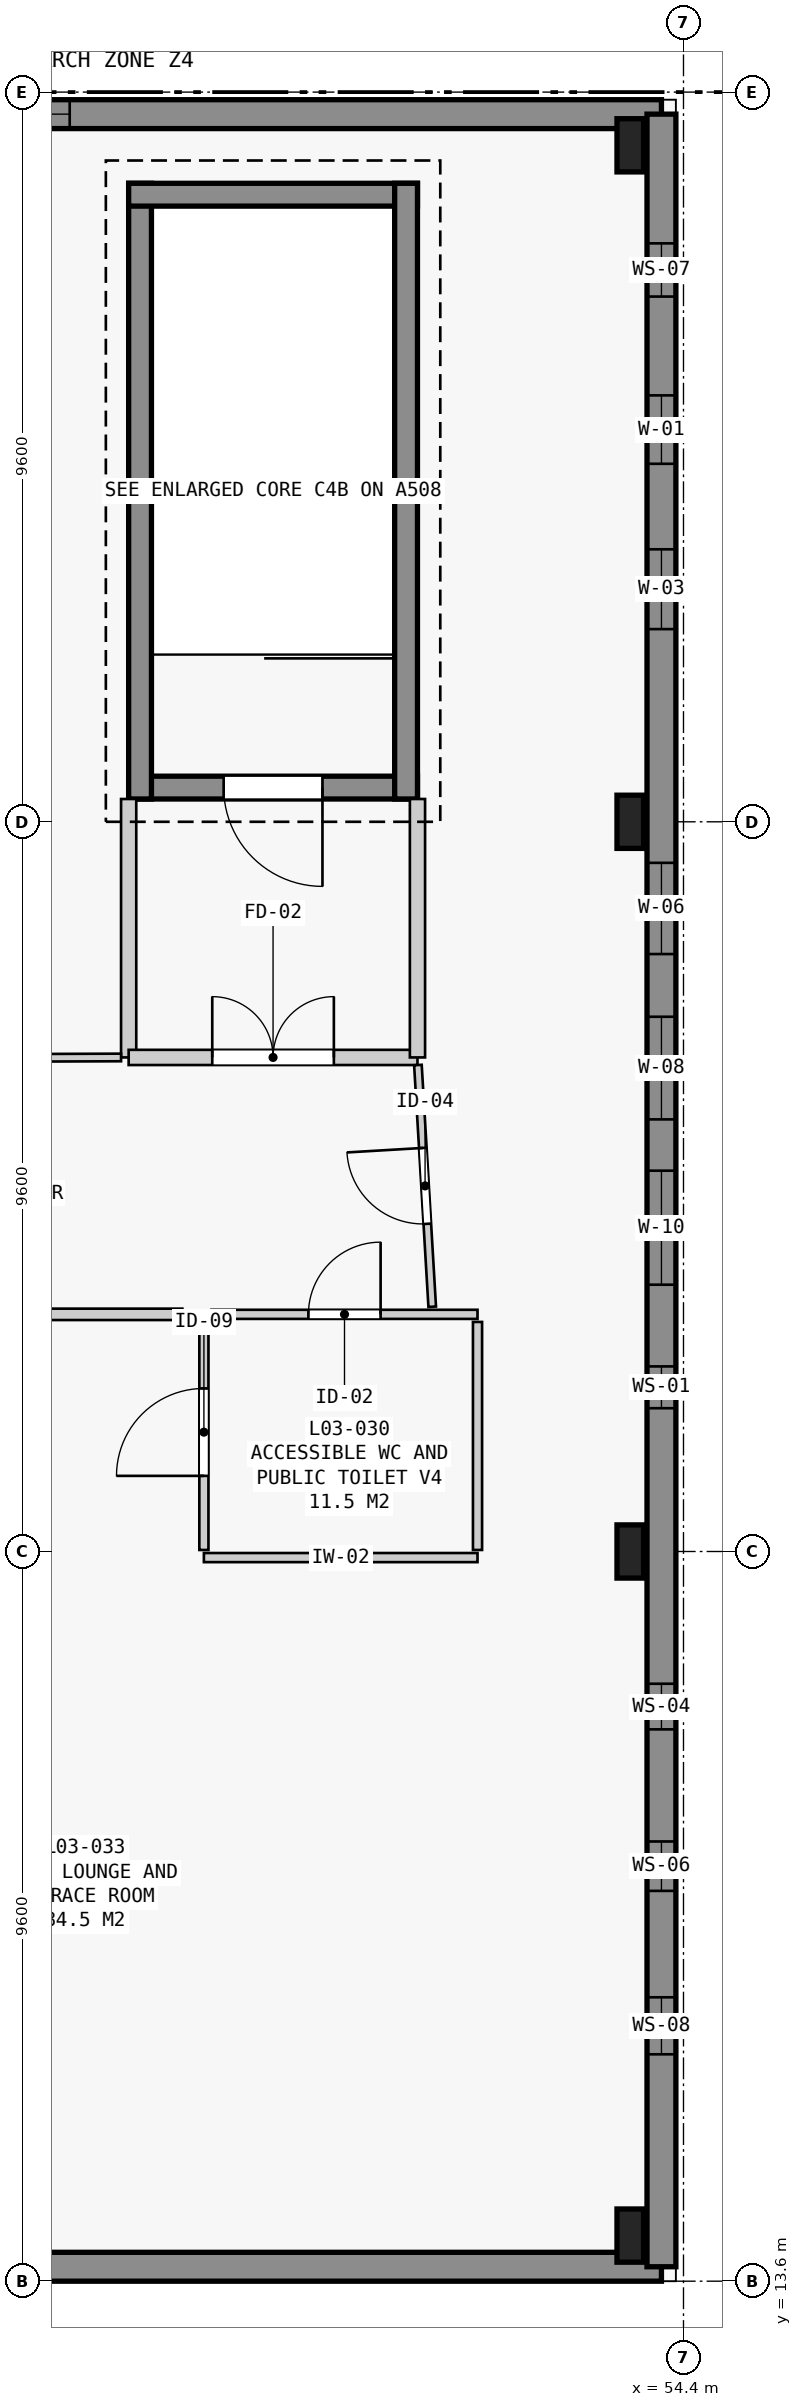
"""IFC4 building model, lengths in metres.
Left out: names, types, materials, properties, quantities, classifications, styles, units other than length and angle.
Written with IfcOpenShell. Run it as: python <this file> out.ifc"""

import sys

from ifc_helpers import new_model, si_unit, direction, frame, frame_2d, origin, origin_2d, place, context, subcontext, project, spatial, rectangle, extrude, element, fill, save


model = new_model("IFC4")
c1 = context("Model", 3, precision=1e-05, world=origin(), true_north=direction((0.0, 1.0)))
c2 = subcontext(c1, "Body", "Model", "MODEL_VIEW")
j1 = project(units=[si_unit("LENGTHUNIT", "METRE"), si_unit("PLANEANGLEUNIT", "RADIAN")], contexts=[c1])
p1 = place(None, origin())
s1 = spatial("IfcSite", under=j1, at=p1, CompositionType="ELEMENT")
p2 = place(p1, origin())
s2 = spatial("IfcBuilding", under=s1, at=p2, CompositionType="ELEMENT")
p3 = place(p2, frame((0.0, 0.0, 13.8)))
s3 = spatial("IfcBuildingStorey", under=s2, at=p3, CompositionType="ELEMENT", Elevation=13.8)
for number, where, z_axis, x_axis in (
    (1, (53.7, 14.2, 0.0), (0.0, 0.0, 1.0), (1.0, 0.0, 0.0)),
    (2, (53.7, 23.2, 0.0), (0.0, 0.0, 1.0), (1.0, 0.0, 0.0)),
    (3, (53.7, 32.8, 0.0), (0.0, 0.0, 1.0), (1.0, 0.0, 0.0)),
    (4, (53.7, 41.7, 0.0), (0.0, 0.0, 1.0), (1.0, 0.0, 0.0)),
):
    element("IfcColumn", number, at=place(p3, frame(where, z_axis=z_axis, x_axis=x_axis)), inside=s3, PredefinedType="COLUMN", context=c2, shape_type="SweptSolid", body=[
        extrude(rectangle(XDim=0.35, YDim=0.7, at=origin_2d()), origin(), (0.0, 0.0, 1.0), 4.5),
    ])
p4 = place(p3, frame((54.11, 13.79, 0.0), z_axis=(0.0, 0.0, 1.0), x_axis=(-1.0, 0.0, 0.0)))
e5 = element("IfcWall", 5, at=p4, inside=s3, PredefinedType="STANDARD", context=c2, shape_type="SweptSolid", body=[
    extrude(rectangle(XDim=18.72, YDim=0.38, at=frame_2d((9.36, 0.0))), origin(), (0.0, 0.0, 1.0), 4.24),
])
p5 = place(p4, frame((8.834, 0.0, 1.05)))
e6 = element("IfcOpeningElement", 6, at=p5, cuts=e5, PredefinedType="OPENING", context=c2, shape_type="SweptSolid", body=[
    extrude(rectangle(XDim=1.8, YDim=2.5, at=frame_2d((0.9, 1.25))), frame((0.0, 0.2, 0.0), z_axis=(0.0, -1.0, 0.0), x_axis=(1.0, 0.0, 0.0)), (0.0, 0.0, 1.0), 0.4),
])
p6 = place(p3, frame((35.39, 42.11, 0.0), z_axis=(0.0, 0.0, 1.0), x_axis=(1.0, 0.0, 0.0)))
e7 = element("IfcWall", 7, at=p6, inside=s3, PredefinedType="STANDARD", context=c2, shape_type="SweptSolid", body=[
    extrude(rectangle(XDim=18.72, YDim=0.38, at=frame_2d((9.36, 0.0))), origin(), (0.0, 0.0, 1.0), 4.24),
])
p7 = place(p6, frame((8.534, 0.0, 1.65)))
e8 = element("IfcOpeningElement", 8, at=p7, cuts=e7, PredefinedType="OPENING", context=c2, shape_type="SweptSolid", body=[
    extrude(rectangle(XDim=2.4, YDim=1.8, at=frame_2d((1.2, 0.9))), frame((0.0, 0.2, 0.0), z_axis=(0.0, -1.0, 0.0), x_axis=(1.0, 0.0, 0.0)), (0.0, 0.0, 1.0), 0.4),
])
p8 = place(p3, frame((54.11, 42.11, 0.0), z_axis=(0.0, 0.0, 1.0), x_axis=(0.0, -1.0, 0.0)))
e9 = element("IfcWall", 9, at=p8, inside=s3, PredefinedType="STANDARD", context=c2, shape_type="SweptSolid", body=[
    extrude(rectangle(XDim=28.32, YDim=0.38, at=frame_2d((14.16, 0.0))), origin(), (0.0, 0.0, 1.0), 4.24),
])
p9 = place(p8, frame((1.7, 0.0, 0.95)))
e10 = element("IfcOpeningElement", 10, at=p9, cuts=e9, PredefinedType="OPENING", context=c2, shape_type="SweptSolid", body=[
    extrude(rectangle(XDim=0.7, YDim=2.1, at=frame_2d((0.35, 1.05))), frame((0.0, 0.2, 0.0), z_axis=(0.0, -1.0, 0.0), x_axis=(1.0, 0.0, 0.0)), (0.0, 0.0, 1.0), 0.4),
])
p10 = place(p8, frame((3.7, 0.0, 0.95)))
e11 = element("IfcOpeningElement", 11, at=p10, cuts=e9, PredefinedType="OPENING", context=c2, shape_type="SweptSolid", body=[
    extrude(rectangle(XDim=0.9, YDim=1.8, at=frame_2d((0.45, 0.9))), frame((0.0, 0.2, 0.0), z_axis=(0.0, -1.0, 0.0), x_axis=(1.0, 0.0, 0.0)), (0.0, 0.0, 1.0), 0.4),
])
p11 = place(p8, frame((5.725, 0.0, 0.95)))
e12 = element("IfcOpeningElement", 12, at=p11, cuts=e9, PredefinedType="OPENING", context=c2, shape_type="SweptSolid", body=[
    extrude(rectangle(XDim=1.05, YDim=1.9, at=frame_2d((0.525, 0.95))), frame((0.0, 0.2, 0.0), z_axis=(0.0, -1.0, 0.0), x_axis=(1.0, 0.0, 0.0)), (0.0, 0.0, 1.0), 0.4),
])
p12 = place(p8, frame((9.85, 0.0, 0.95)))
e13 = element("IfcOpeningElement", 13, at=p12, cuts=e9, PredefinedType="OPENING", context=c2, shape_type="SweptSolid", body=[
    extrude(rectangle(XDim=1.2, YDim=2.1, at=frame_2d((0.6, 1.05))), frame((0.0, 0.2, 0.0), z_axis=(0.0, -1.0, 0.0), x_axis=(1.0, 0.0, 0.0)), (0.0, 0.0, 1.0), 0.4),
])
p13 = place(p8, frame((11.875, 0.0, 0.95)))
e14 = element("IfcOpeningElement", 14, at=p13, cuts=e9, PredefinedType="OPENING", context=c2, shape_type="SweptSolid", body=[
    extrude(rectangle(XDim=1.35, YDim=2.1, at=frame_2d((0.675, 1.05))), frame((0.0, 0.2, 0.0), z_axis=(0.0, -1.0, 0.0), x_axis=(1.0, 0.0, 0.0)), (0.0, 0.0, 1.0), 0.4),
])
p14 = place(p8, frame((13.9, 0.0, 0.95)))
e15 = element("IfcOpeningElement", 15, at=p14, cuts=e9, PredefinedType="OPENING", context=c2, shape_type="SweptSolid", body=[
    extrude(rectangle(XDim=1.5, YDim=1.8, at=frame_2d((0.75, 0.9))), frame((0.0, 0.2, 0.0), z_axis=(0.0, -1.0, 0.0), x_axis=(1.0, 0.0, 0.0)), (0.0, 0.0, 1.0), 0.4),
])
p15 = place(p8, frame((16.475, 0.0, 0.95)))
e16 = element("IfcOpeningElement", 16, at=p15, cuts=e9, PredefinedType="OPENING", context=c2, shape_type="SweptSolid", body=[
    extrude(rectangle(XDim=0.55, YDim=1.8, at=frame_2d((0.275, 0.9))), frame((0.0, 0.2, 0.0), z_axis=(0.0, -1.0, 0.0), x_axis=(1.0, 0.0, 0.0)), (0.0, 0.0, 1.0), 0.4),
])
p16 = place(p8, frame((20.65, 0.0, 0.95)))
e17 = element("IfcOpeningElement", 17, at=p16, cuts=e9, PredefinedType="OPENING", context=c2, shape_type="SweptSolid", body=[
    extrude(rectangle(XDim=0.6, YDim=2.2, at=frame_2d((0.3, 1.1))), frame((0.0, 0.2, 0.0), z_axis=(0.0, -1.0, 0.0), x_axis=(1.0, 0.0, 0.0)), (0.0, 0.0, 1.0), 0.4),
])
p17 = place(p8, frame((22.725, 0.0, 0.95)))
e18 = element("IfcOpeningElement", 18, at=p17, cuts=e9, PredefinedType="OPENING", context=c2, shape_type="SweptSolid", body=[
    extrude(rectangle(XDim=0.65, YDim=2.4, at=frame_2d((0.325, 1.2))), frame((0.0, 0.2, 0.0), z_axis=(0.0, -1.0, 0.0), x_axis=(1.0, 0.0, 0.0)), (0.0, 0.0, 1.0), 0.4),
])
p18 = place(p8, frame((24.775, 0.0, 0.95)))
e19 = element("IfcOpeningElement", 19, at=p18, cuts=e9, PredefinedType="OPENING", context=c2, shape_type="SweptSolid", body=[
    extrude(rectangle(XDim=0.75, YDim=2.3, at=frame_2d((0.375, 1.15))), frame((0.0, 0.2, 0.0), z_axis=(0.0, -1.0, 0.0), x_axis=(1.0, 0.0, 0.0)), (0.0, 0.0, 1.0), 0.4),
])
p19 = place(p3, frame((50.9, 33.25, 0.0), z_axis=(0.0, 0.0, 1.0), x_axis=(-1.0, 0.0, 0.0)))
e20 = element("IfcWall", 20, at=p19, inside=s3, PredefinedType="SHEAR", context=c2, shape_type="SweptSolid", body=[
    extrude(rectangle(XDim=3.8, YDim=0.3, at=frame_2d((1.9, 0.0))), origin(), (0.0, 0.0, 1.0), 4.5),
])
p20 = place(p19, frame((1.25, 0.0, 0.0)))
e21 = element("IfcOpeningElement", 21, at=p20, cuts=e20, PredefinedType="OPENING", context=c2, shape_type="SweptSolid", body=[
    extrude(rectangle(XDim=1.3, YDim=2.2, at=frame_2d((0.65, 1.1))), frame((0.0, 0.16, 0.0), z_axis=(0.0, -1.0, 0.0), x_axis=(1.0, 0.0, 0.0)), (0.0, 0.0, 1.0), 0.32),
])
p21 = place(p3, frame((47.25, 33.1, 0.0), z_axis=(0.0, 0.0, 1.0), x_axis=(0.0, 1.0, 0.0)))
e22 = element("IfcWall", 22, at=p21, inside=s3, PredefinedType="SHEAR", context=c2, shape_type="SweptSolid", body=[
    extrude(rectangle(XDim=8.1, YDim=0.3, at=frame_2d((4.05, 0.0))), origin(), (0.0, 0.0, 1.0), 4.5),
])
p22 = place(p3, frame((47.1, 41.05, 0.0), z_axis=(0.0, 0.0, 1.0), x_axis=(1.0, 0.0, 0.0)))
e23 = element("IfcWall", 23, at=p22, inside=s3, PredefinedType="SHEAR", context=c2, shape_type="SweptSolid", body=[
    extrude(rectangle(XDim=3.8, YDim=0.3, at=frame_2d((1.9, 0.0))), origin(), (0.0, 0.0, 1.0), 4.5),
])
p23 = place(p3, frame((50.75, 41.2, 0.0), z_axis=(0.0, 0.0, 1.0), x_axis=(0.0, -1.0, 0.0)))
e24 = element("IfcWall", 24, at=p23, inside=s3, PredefinedType="SHEAR", context=c2, shape_type="SweptSolid", body=[
    extrude(rectangle(XDim=8.1, YDim=0.3, at=frame_2d((4.05, 0.0))), origin(), (0.0, 0.0, 1.0), 4.5),
])
p24 = place(p3, frame((47.1, 33.1, 0.0), z_axis=(0.0, 0.0, 1.0), x_axis=(0.0, -1.0, 0.0)))
e25 = element("IfcWall", 25, at=p24, inside=s3, PredefinedType="STANDARD", context=c2, shape_type="SweptSolid", body=[
    extrude(rectangle(XDim=3.4, YDim=0.2, at=frame_2d((1.7, 0.0))), origin(), (0.0, 0.0, 1.0), 3.47),
])
p25 = place(p3, frame((47.1, 29.7, 0.0), z_axis=(0.0, 0.0, 1.0), x_axis=(1.0, 0.0, 0.0)))
e26 = element("IfcWall", 26, at=p25, inside=s3, PredefinedType="STANDARD", context=c2, shape_type="SweptSolid", body=[
    extrude(rectangle(XDim=3.8, YDim=0.2, at=frame_2d((1.9, 0.0))), origin(), (0.0, 0.0, 1.0), 4.5),
])
p26 = place(p25, frame((1.1, 0.0, 0.0)))
e27 = element("IfcOpeningElement", 27, at=p26, cuts=e26, PredefinedType="OPENING", context=c2, shape_type="SweptSolid", body=[
    extrude(rectangle(XDim=1.6, YDim=2.2, at=frame_2d((0.8, 1.1))), frame((0.0, 0.11, 0.0), z_axis=(0.0, -1.0, 0.0), x_axis=(1.0, 0.0, 0.0)), (0.0, 0.0, 1.0), 0.22),
])
p27 = place(p3, frame((50.9, 29.7, 0.0), z_axis=(0.0, 0.0, 1.0), x_axis=(0.0, 1.0, 0.0)))
e28 = element("IfcWall", 28, at=p27, inside=s3, PredefinedType="STANDARD", context=c2, shape_type="SweptSolid", body=[
    extrude(rectangle(XDim=3.4, YDim=0.2, at=frame_2d((1.7, 0.0))), origin(), (0.0, 0.0, 1.0), 3.47),
])
p28 = place(p3, frame((51.69, 23.12, 0.0), z_axis=(0.0, 0.0, 1.0), x_axis=(-1.0, 0.0, 0.0)))
e29 = element("IfcWall", 29, at=p28, inside=s3, PredefinedType="PARTITIONING", context=c2, shape_type="SweptSolid", body=[
    extrude(rectangle(XDim=3.6, YDim=0.12, at=frame_2d((1.8, 0.0))), origin(), (0.0, 0.0, 1.0), 3.52),
])
p29 = place(p3, frame((48.09, 23.22, 0.0), z_axis=(0.0, 0.0, 1.0), x_axis=(0.0, 1.0, 0.0)))
e30 = element("IfcWall", 30, at=p29, inside=s3, PredefinedType="PARTITIONING", context=c2, shape_type="SweptSolid", body=[
    extrude(rectangle(XDim=3.1, YDim=0.12, at=frame_2d((1.55, 0.0))), origin(), (0.0, 0.0, 1.0), 3.52),
])
p30 = place(p29, frame((0.975, 0.0, 0.0)))
e31 = element("IfcOpeningElement", 31, at=p30, cuts=e30, PredefinedType="OPENING", context=c2, shape_type="SweptSolid", body=[
    extrude(rectangle(XDim=1.15, YDim=2.2, at=frame_2d((0.575, 1.1))), frame((0.0, 0.07, 0.0), z_axis=(0.0, -1.0, 0.0), x_axis=(1.0, 0.0, 0.0)), (0.0, 0.0, 1.0), 0.14),
])
p31 = place(p3, frame((48.19, 26.32, 0.0), z_axis=(0.0, 0.0, 1.0), x_axis=(1.0, 0.0, 0.0)))
e32 = element("IfcWall", 32, at=p31, inside=s3, PredefinedType="PARTITIONING", context=c2, shape_type="SweptSolid", body=[
    extrude(rectangle(XDim=3.5, YDim=0.12, at=frame_2d((1.75, 0.0))), origin(), (0.0, 0.0, 1.0), 4.24),
])
p32 = place(p31, frame((1.275, 0.0, 0.0)))
e33 = element("IfcOpeningElement", 33, at=p32, cuts=e32, PredefinedType="OPENING", context=c2, shape_type="SweptSolid", body=[
    extrude(rectangle(XDim=0.95, YDim=2.15, at=frame_2d((0.475, 1.075))), frame((0.0, 0.07, 0.0), z_axis=(0.0, -1.0, 0.0), x_axis=(1.0, 0.0, 0.0)), (0.0, 0.0, 1.0), 0.14),
])
p33 = place(p3, frame((51.69, 26.22, 0.0), z_axis=(0.0, 0.0, 1.0), x_axis=(0.0, -1.0, 0.0)))
e34 = element("IfcWall", 34, at=p33, inside=s3, PredefinedType="PARTITIONING", context=c2, shape_type="SweptSolid", body=[
    extrude(rectangle(XDim=3.0, YDim=0.12, at=frame_2d((1.5, 0.0))), origin(), (0.0, 0.0, 1.0), 3.52),
])
p34 = place(p3, frame((47.0, 29.7, 0.0), z_axis=(0.0, 0.0, 1.0), x_axis=(-0.99999313943, -0.003704199279, 0.0)))
e35 = element("IfcWall", 35, at=p34, inside=s3, PredefinedType="PARTITIONING", context=c2, shape_type="SweptSolid", body=[
    extrude(rectangle(XDim=5.207, YDim=0.1, at=frame_2d((2.604, 0.0))), origin(), (0.0, 0.0, 1.0), 3.77),
])
p35 = place(p3, frame((45.2, 26.32, 0.0), z_axis=(0.0, 0.0, 1.0), x_axis=(1.0, 0.0, 0.0)))
e36 = element("IfcWall", 36, at=p35, inside=s3, PredefinedType="PARTITIONING", context=c2, shape_type="SweptSolid", body=[
    extrude(rectangle(XDim=2.607, YDim=0.15, at=frame_2d((1.303, 0.0))), origin(), (0.0, 0.0, 1.0), 4.24),
])
p36 = place(p3, frame((51.094, 26.42, 0.0), z_axis=(0.0, 0.0, 1.0), x_axis=(-0.059009535749, 0.998257419051, 0.0)))
e37 = element("IfcWall", 37, at=p36, inside=s3, PredefinedType="PARTITIONING", context=c2, shape_type="SweptSolid", body=[
    extrude(rectangle(XDim=3.186, YDim=0.1, at=frame_2d((1.593, 0.0))), origin(), (0.0, 0.0, 1.0), 4.24),
])
p37 = place(p36, frame((1.093, 0.0, 0.0)))
e38 = element("IfcOpeningElement", 38, at=p37, cuts=e37, PredefinedType="OPENING", context=c2, shape_type="SweptSolid", body=[
    extrude(rectangle(XDim=1.0, YDim=2.15, at=frame_2d((0.5, 1.075))), frame((0.0, 0.06, 0.0), z_axis=(0.0, -1.0, 0.0), x_axis=(1.0, 0.0, 0.0)), (0.0, 0.0, 1.0), 0.12),
])
p38 = place(p7, origin())
e39 = element("IfcWindow", 39, at=p38, inside=s3, PartitioningType="SINGLE_PANEL", PredefinedType="WINDOW", context=c2, shape_type="SweptSolid", body=[
    extrude(rectangle(XDim=2.4, YDim=1.8, at=frame_2d((1.2, 0.9))), frame((0.0, 0.03, 0.0), z_axis=(0.0, -1.0, 0.0), x_axis=(1.0, 0.0, 0.0)), (0.0, 0.0, 1.0), 0.06),
])
fill(e8, e39)
p39 = place(p9, origin())
e40 = element("IfcWindow", 40, at=p39, inside=s3, PartitioningType="SINGLE_PANEL", PredefinedType="WINDOW", context=c2, shape_type="SweptSolid", body=[
    extrude(rectangle(XDim=0.7, YDim=2.1, at=frame_2d((0.35, 1.05))), frame((0.0, 0.03, 0.0), z_axis=(0.0, -1.0, 0.0), x_axis=(1.0, 0.0, 0.0)), (0.0, 0.0, 1.0), 0.06),
])
fill(e10, e40)
p40 = place(p10, origin())
e41 = element("IfcWindow", 41, at=p40, inside=s3, PartitioningType="SINGLE_PANEL", PredefinedType="WINDOW", context=c2, shape_type="SweptSolid", body=[
    extrude(rectangle(XDim=0.9, YDim=1.8, at=frame_2d((0.45, 0.9))), frame((0.0, 0.03, 0.0), z_axis=(0.0, -1.0, 0.0), x_axis=(1.0, 0.0, 0.0)), (0.0, 0.0, 1.0), 0.06),
])
fill(e11, e41)
p41 = place(p11, origin())
e42 = element("IfcWindow", 42, at=p41, inside=s3, PartitioningType="SINGLE_PANEL", PredefinedType="WINDOW", context=c2, shape_type="SweptSolid", body=[
    extrude(rectangle(XDim=1.05, YDim=1.9, at=frame_2d((0.525, 0.95))), frame((0.0, 0.03, 0.0), z_axis=(0.0, -1.0, 0.0), x_axis=(1.0, 0.0, 0.0)), (0.0, 0.0, 1.0), 0.06),
])
fill(e12, e42)
p42 = place(p12, origin())
e43 = element("IfcWindow", 43, at=p42, inside=s3, PartitioningType="SINGLE_PANEL", PredefinedType="WINDOW", context=c2, shape_type="SweptSolid", body=[
    extrude(rectangle(XDim=1.2, YDim=2.1, at=frame_2d((0.6, 1.05))), frame((0.0, 0.03, 0.0), z_axis=(0.0, -1.0, 0.0), x_axis=(1.0, 0.0, 0.0)), (0.0, 0.0, 1.0), 0.06),
])
fill(e13, e43)
p43 = place(p13, origin())
e44 = element("IfcWindow", 44, at=p43, inside=s3, PartitioningType="SINGLE_PANEL", PredefinedType="WINDOW", context=c2, shape_type="SweptSolid", body=[
    extrude(rectangle(XDim=1.35, YDim=2.1, at=frame_2d((0.675, 1.05))), frame((0.0, 0.03, 0.0), z_axis=(0.0, -1.0, 0.0), x_axis=(1.0, 0.0, 0.0)), (0.0, 0.0, 1.0), 0.06),
])
fill(e14, e44)
p44 = place(p14, origin())
e45 = element("IfcWindow", 45, at=p44, inside=s3, PartitioningType="SINGLE_PANEL", PredefinedType="WINDOW", context=c2, shape_type="SweptSolid", body=[
    extrude(rectangle(XDim=1.5, YDim=1.8, at=frame_2d((0.75, 0.9))), frame((0.0, 0.03, 0.0), z_axis=(0.0, -1.0, 0.0), x_axis=(1.0, 0.0, 0.0)), (0.0, 0.0, 1.0), 0.06),
])
fill(e15, e45)
p45 = place(p15, origin())
e46 = element("IfcWindow", 46, at=p45, inside=s3, PartitioningType="SINGLE_PANEL", PredefinedType="WINDOW", context=c2, shape_type="SweptSolid", body=[
    extrude(rectangle(XDim=0.55, YDim=1.8, at=frame_2d((0.275, 0.9))), frame((0.0, 0.03, 0.0), z_axis=(0.0, -1.0, 0.0), x_axis=(1.0, 0.0, 0.0)), (0.0, 0.0, 1.0), 0.06),
])
fill(e16, e46)
p46 = place(p16, origin())
e47 = element("IfcWindow", 47, at=p46, inside=s3, PartitioningType="SINGLE_PANEL", PredefinedType="WINDOW", context=c2, shape_type="SweptSolid", body=[
    extrude(rectangle(XDim=0.6, YDim=2.2, at=frame_2d((0.3, 1.1))), frame((0.0, 0.03, 0.0), z_axis=(0.0, -1.0, 0.0), x_axis=(1.0, 0.0, 0.0)), (0.0, 0.0, 1.0), 0.06),
])
fill(e17, e47)
p47 = place(p17, origin())
e48 = element("IfcWindow", 48, at=p47, inside=s3, PartitioningType="SINGLE_PANEL", PredefinedType="WINDOW", context=c2, shape_type="SweptSolid", body=[
    extrude(rectangle(XDim=0.65, YDim=2.4, at=frame_2d((0.325, 1.2))), frame((0.0, 0.03, 0.0), z_axis=(0.0, -1.0, 0.0), x_axis=(1.0, 0.0, 0.0)), (0.0, 0.0, 1.0), 0.06),
])
fill(e18, e48)
p48 = place(p18, origin())
e49 = element("IfcWindow", 49, at=p48, inside=s3, PartitioningType="SINGLE_PANEL", PredefinedType="WINDOW", context=c2, shape_type="SweptSolid", body=[
    extrude(rectangle(XDim=0.75, YDim=2.3, at=frame_2d((0.375, 1.15))), frame((0.0, 0.03, 0.0), z_axis=(0.0, -1.0, 0.0), x_axis=(1.0, 0.0, 0.0)), (0.0, 0.0, 1.0), 0.06),
])
fill(e19, e49)
p49 = place(p20, origin())
e50 = element("IfcDoor", 50, at=p49, inside=s3, OperationType="SINGLE_SWING_LEFT", PredefinedType="DOOR", context=c2, shape_type="SweptSolid", body=[
    extrude(rectangle(XDim=1.3, YDim=2.2, at=frame_2d((0.65, 1.1))), frame((0.0, 0.025, 0.0), z_axis=(0.0, -1.0, 0.0), x_axis=(1.0, 0.0, 0.0)), (0.0, 0.0, 1.0), 0.05),
])
fill(e21, e50)
p50 = place(p26, origin())
e51 = element("IfcDoor", 51, at=p50, inside=s3, OperationType="DOUBLE_DOOR_SINGLE_SWING", PredefinedType="DOOR", context=c2, shape_type="SweptSolid", body=[
    extrude(rectangle(XDim=1.6, YDim=2.2, at=frame_2d((0.8, 1.1))), frame((0.0, 0.025, 0.0), z_axis=(0.0, -1.0, 0.0), x_axis=(1.0, 0.0, 0.0)), (0.0, 0.0, 1.0), 0.05),
])
fill(e27, e51)
p51 = place(p32, origin())
e52 = element("IfcDoor", 52, at=p51, inside=s3, OperationType="SINGLE_SWING_RIGHT", PredefinedType="DOOR", context=c2, shape_type="SweptSolid", body=[
    extrude(rectangle(XDim=0.95, YDim=2.15, at=frame_2d((0.475, 1.075))), frame((0.0, 0.025, 0.0), z_axis=(0.0, -1.0, 0.0), x_axis=(1.0, 0.0, 0.0)), (0.0, 0.0, 1.0), 0.05),
])
fill(e33, e52)
p52 = place(p30, origin())
e53 = element("IfcDoor", 53, at=p52, inside=s3, OperationType="SINGLE_SWING_LEFT", PredefinedType="DOOR", context=c2, shape_type="SweptSolid", body=[
    extrude(rectangle(XDim=1.15, YDim=2.2, at=frame_2d((0.575, 1.1))), frame((0.0, 0.025, 0.0), z_axis=(0.0, -1.0, 0.0), x_axis=(1.0, 0.0, 0.0)), (0.0, 0.0, 1.0), 0.05),
])
fill(e31, e53)
p53 = place(p37, origin())
e54 = element("IfcDoor", 54, at=p53, inside=s3, OperationType="SINGLE_SWING_RIGHT", PredefinedType="DOOR", context=c2, shape_type="SweptSolid", body=[
    extrude(rectangle(XDim=1.0, YDim=2.15, at=frame_2d((0.5, 1.075))), frame((0.0, 0.025, 0.0), z_axis=(0.0, -1.0, 0.0), x_axis=(1.0, 0.0, 0.0)), (0.0, 0.0, 1.0), 0.05),
])
fill(e38, e54)
save(model, sys.argv[1])
